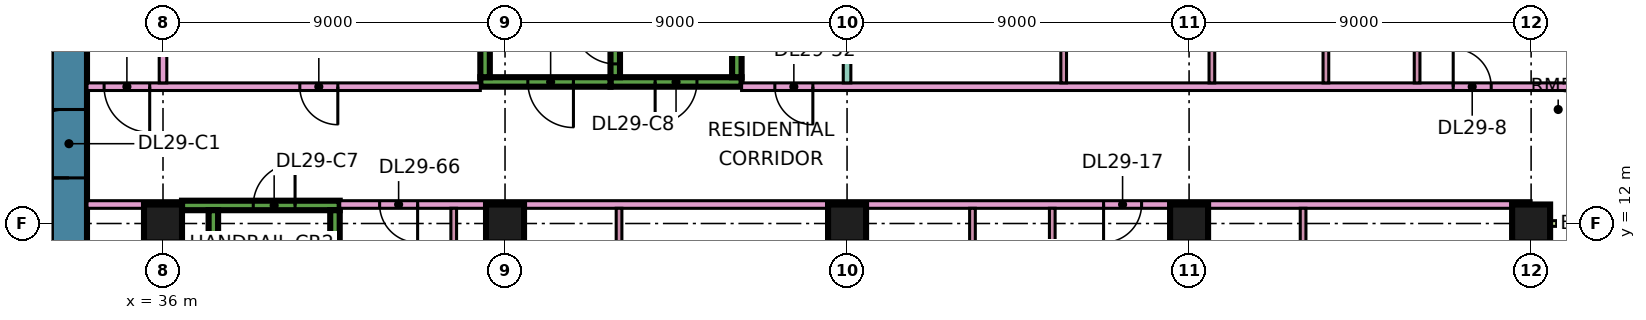
"""IFC4 building model, lengths in metres.
Left out: names, types, materials, properties, quantities, classifications, styles, units other than length and angle.
Written with IfcOpenShell. Run it as: python <this file> out.ifc"""

import sys

from ifc_helpers import new_model, si_unit, direction, frame, frame_2d, origin, origin_2d, place, context, subcontext, project, spatial, rectangle, extrude, element, fill, save


model = new_model("IFC4")
c1 = context("Model", 3, precision=1e-05, world=origin(), true_north=direction((0.0, 1.0)))
c2 = subcontext(c1, "Body", "Model", "MODEL_VIEW")
j1 = project(units=[si_unit("LENGTHUNIT", "METRE"), si_unit("PLANEANGLEUNIT", "RADIAN")], contexts=[c1])
p1 = place(None, origin())
s1 = spatial("IfcSite", under=j1, at=p1, CompositionType="ELEMENT")
p2 = place(p1, origin())
s2 = spatial("IfcBuilding", under=s1, at=p2, CompositionType="ELEMENT")
p3 = place(p2, frame((0.0, 0.0, 125.65)))
s3 = spatial("IfcBuildingStorey", under=s2, at=p3, CompositionType="ELEMENT", Elevation=125.65)
for number, where, z_axis, x_axis in (
    (1, (36.0, 12.0, 0.0), (0.0, 0.0, 1.0), (1.0, 0.0, 0.0)),
    (2, (45.0, 12.0, 0.0), (0.0, 0.0, 1.0), (1.0, 0.0, 0.0)),
    (3, (54.0, 12.0, 0.0), (0.0, 0.0, 1.0), (1.0, 0.0, 0.0)),
    (4, (63.0, 12.0, 0.0), (0.0, 0.0, 1.0), (1.0, 0.0, 0.0)),
    (5, (72.0, 12.0, 0.0), (0.0, 0.0, 1.0), (1.0, 0.0, 0.0)),
):
    element("IfcColumn", number, at=place(p3, frame(where, z_axis=z_axis, x_axis=x_axis)), inside=s3, PredefinedType="COLUMN", context=c2, shape_type="SweptSolid", body=[
        extrude(rectangle(XDim=1.0, YDim=1.0, at=origin_2d()), origin(), (0.0, 0.0, 1.0), 3.75),
    ])
p4 = place(p3, frame((33.525, 7.95, 0.0), z_axis=(0.0, 0.0, 1.0), x_axis=(0.0, 1.0, 0.0)))
e6 = element("IfcWall", 6, at=p4, inside=s3, PredefinedType="SHEAR", context=c2, shape_type="SweptSolid", body=[
    extrude(rectangle(XDim=11.1, YDim=0.95, at=frame_2d((5.55, 0.0))), origin(), (0.0, 0.0, 1.0), 3.75),
])
p5 = place(p4, frame((5.25, 0.0, 0.0)))
e7 = element("IfcOpeningElement", 7, at=p5, cuts=e6, PredefinedType="OPENING", context=c2, shape_type="SweptSolid", body=[
    extrude(rectangle(XDim=1.8, YDim=2.4, at=frame_2d((0.9, 1.2))), frame((0.0, 0.485, 0.0), z_axis=(0.0, -1.0, 0.0), x_axis=(1.0, 0.0, 0.0)), (0.0, 0.0, 1.0), 0.97),
])
p6 = place(p3, frame((36.5, 12.475, 0.0), z_axis=(0.0, 0.0, 1.0), x_axis=(1.0, 0.0, 0.0)))
e8 = element("IfcWall", 8, at=p6, inside=s3, PredefinedType="SHEAR", context=c2, shape_type="SweptSolid", body=[
    extrude(rectangle(XDim=4.15, YDim=0.25, at=frame_2d((2.075, 0.0))), origin(), (0.0, 0.0, 1.0), 3.75),
])
p7 = place(p6, frame((1.875, 0.0, 0.0)))
e9 = element("IfcOpeningElement", 9, at=p7, cuts=e8, PredefinedType="OPENING", context=c2, shape_type="SweptSolid", body=[
    extrude(rectangle(XDim=1.1, YDim=2.2, at=frame_2d((0.55, 1.1))), frame((0.0, 0.135, 0.0), z_axis=(0.0, -1.0, 0.0), x_axis=(1.0, 0.0, 0.0)), (0.0, 0.0, 1.0), 0.27),
])
for number, where, z_axis, x_axis in (
    (10, (37.325, 5.85, 0.0), (0.0, 0.0, 1.0), (0.0, 1.0, 0.0)),
    (11, (40.525, 5.85, 0.0), (0.0, 0.0, 1.0), (0.0, 1.0, 0.0)),
):
    element("IfcWall", number, at=place(p3, frame(where, z_axis=z_axis, x_axis=x_axis)), inside=s3, PredefinedType="SHEAR", context=c2, shape_type="SweptSolid", body=[
        extrude(rectangle(XDim=6.5, YDim=0.25, at=frame_2d((3.25, 0.0))), origin(), (0.0, 0.0, 1.0), 3.75),
    ])
p8 = place(p3, frame((47.775, 15.725, 0.0), z_axis=(0.0, 0.0, 1.0), x_axis=(1.0, 0.0, 0.0)))
e12 = element("IfcWall", 12, at=p8, inside=s3, PredefinedType="SHEAR", context=c2, shape_type="SweptSolid", body=[
    extrude(rectangle(XDim=3.45, YDim=0.25, at=frame_2d((1.725, 0.0))), origin(), (0.0, 0.0, 1.0), 3.75),
])
p9 = place(p8, frame((1.175, 0.0, 0.0)))
e13 = element("IfcOpeningElement", 13, at=p9, cuts=e12, PredefinedType="OPENING", context=c2, shape_type="SweptSolid", body=[
    extrude(rectangle(XDim=1.1, YDim=2.2, at=frame_2d((0.55, 1.1))), frame((0.0, 0.135, 0.0), z_axis=(0.0, -1.0, 0.0), x_axis=(1.0, 0.0, 0.0)), (0.0, 0.0, 1.0), 0.27),
])
p10 = place(p3, frame((47.9, 15.85, 0.0), z_axis=(0.0, 0.0, 1.0), x_axis=(0.0, 1.0, 0.0)))
e14 = element("IfcWall", 14, at=p10, inside=s3, PredefinedType="SHEAR", context=c2, shape_type="SweptSolid", body=[
    extrude(rectangle(XDim=6.5, YDim=0.25, at=frame_2d((3.25, 0.0))), origin(), (0.0, 0.0, 1.0), 3.75),
])
p11 = place(p10, frame((0.35, 0.0, 0.0)))
e15 = element("IfcOpeningElement", 15, at=p11, cuts=e14, PredefinedType="OPENING", context=c2, shape_type="SweptSolid", body=[
    extrude(rectangle(XDim=1.1, YDim=2.2, at=frame_2d((0.55, 1.1))), frame((0.0, 0.135, 0.0), z_axis=(0.0, -1.0, 0.0), x_axis=(1.0, 0.0, 0.0)), (0.0, 0.0, 1.0), 0.27),
])
p12 = place(p3, frame((51.1, 15.85, 0.0), z_axis=(0.0, 0.0, 1.0), x_axis=(0.0, 1.0, 0.0)))
e16 = element("IfcWall", 16, at=p12, inside=s3, PredefinedType="SHEAR", context=c2, shape_type="SweptSolid", body=[
    extrude(rectangle(XDim=6.5, YDim=0.25, at=frame_2d((3.25, 0.0))), origin(), (0.0, 0.0, 1.0), 3.75),
])
p13 = place(p3, frame((44.35, 15.725, 0.0), z_axis=(0.0, 0.0, 1.0), x_axis=(1.0, 0.0, 0.0)))
e17 = element("IfcWall", 17, at=p13, inside=s3, PredefinedType="SHEAR", context=c2, shape_type="SweptSolid", body=[
    extrude(rectangle(XDim=3.425, YDim=0.25, at=frame_2d((1.712, 0.0))), origin(), (0.0, 0.0, 1.0), 3.75),
])
p14 = place(p13, frame((1.25, 0.0, 0.0)))
e18 = element("IfcOpeningElement", 18, at=p14, cuts=e17, PredefinedType="OPENING", context=c2, shape_type="SweptSolid", body=[
    extrude(rectangle(XDim=1.2, YDim=2.2, at=frame_2d((0.6, 1.1))), frame((0.0, 0.135, 0.0), z_axis=(0.0, -1.0, 0.0), x_axis=(1.0, 0.0, 0.0)), (0.0, 0.0, 1.0), 0.27),
])
p15 = place(p3, frame((44.475, 15.85, 0.0), z_axis=(0.0, 0.0, 1.0), x_axis=(0.0, 1.0, 0.0)))
e19 = element("IfcWall", 19, at=p15, inside=s3, PredefinedType="SHEAR", context=c2, shape_type="SweptSolid", body=[
    extrude(rectangle(XDim=6.5, YDim=0.25, at=frame_2d((3.25, 0.0))), origin(), (0.0, 0.0, 1.0), 3.75),
])
p16 = place(p15, frame((1.75, 0.0, 0.0)))
e20 = element("IfcOpeningElement", 20, at=p16, cuts=e19, PredefinedType="OPENING", context=c2, shape_type="SweptSolid", body=[
    extrude(rectangle(XDim=1.1, YDim=2.2, at=frame_2d((0.55, 1.1))), frame((0.0, 0.135, 0.0), z_axis=(0.0, -1.0, 0.0), x_axis=(1.0, 0.0, 0.0)), (0.0, 0.0, 1.0), 0.27),
])
p17 = place(p15, frame((4.3, 0.0, 0.0)))
e21 = element("IfcOpeningElement", 21, at=p17, cuts=e19, PredefinedType="OPENING", context=c2, shape_type="SweptSolid", body=[
    extrude(rectangle(XDim=1.1, YDim=2.2, at=frame_2d((0.55, 1.1))), frame((0.0, 0.135, 0.0), z_axis=(0.0, -1.0, 0.0), x_axis=(1.0, 0.0, 0.0)), (0.0, 0.0, 1.0), 0.27),
])
p18 = place(p3, frame((72.0, 1.575, 0.0), z_axis=(0.0, 0.0, 1.0), x_axis=(0.0, 1.0, 0.0)))
e22 = element("IfcWall", 22, at=p18, inside=s3, PredefinedType="SOLIDWALL", context=c2, shape_type="SweptSolid", body=[
    extrude(rectangle(XDim=10.35, YDim=0.15, at=frame_2d((5.175, 0.0))), origin(), (0.0, 0.0, 1.0), 3.35),
])
p19 = place(p18, frame((1.562, 0.0, 0.0)))
e23 = element("IfcOpeningElement", 23, at=p19, cuts=e22, PredefinedType="OPENING", context=c2, shape_type="SweptSolid", body=[
    extrude(rectangle(XDim=1.8, YDim=2.4, at=frame_2d((0.9, 1.2))), frame((0.0, 0.085, 0.0), z_axis=(0.0, -1.0, 0.0), x_axis=(1.0, 0.0, 0.0)), (0.0, 0.0, 1.0), 0.17),
])
p20 = place(p18, frame((6.475, 0.0, 0.45)))
e24 = element("IfcOpeningElement", 24, at=p20, cuts=e22, PredefinedType="OPENING", context=c2, shape_type="SweptSolid", body=[
    extrude(rectangle(XDim=3.0, YDim=2.4, at=frame_2d((1.5, 1.2))), frame((0.0, 0.085, 0.0), z_axis=(0.0, -1.0, 0.0), x_axis=(1.0, 0.0, 0.0)), (0.0, 0.0, 1.0), 0.17),
])
p21 = place(p3, frame((73.5, 12.0, 0.0), z_axis=(0.0, 0.0, 1.0), x_axis=(-1.0, 0.0, 0.0)))
e25 = element("IfcWall", 25, at=p21, inside=s3, PredefinedType="SOLIDWALL", context=c2, shape_type="SweptSolid", body=[
    extrude(rectangle(XDim=1.5, YDim=0.15, at=frame_2d((0.75, 0.0))), origin(), (0.0, 0.0, 1.0), 3.35),
])
p22 = place(p3, frame((34.0, 12.5, 0.0), z_axis=(0.0, 0.0, 1.0), x_axis=(1.0, 0.0, 0.0)))
e26 = element("IfcWall", 26, at=p22, inside=s3, PredefinedType="PARTITIONING", context=c2, shape_type="SweptSolid", body=[
    extrude(rectangle(XDim=2.501, YDim=0.2, at=frame_2d((1.25, 0.0))), origin(), (0.0, 0.0, 1.0), 3.35),
])
p23 = place(p3, frame((34.0, 15.6, 0.0), z_axis=(0.0, 0.0, 1.0), x_axis=(1.0, 0.0, 0.0)))
e27 = element("IfcWall", 27, at=p23, inside=s3, PredefinedType="PARTITIONING", context=c2, shape_type="SweptSolid", body=[
    extrude(rectangle(XDim=10.35, YDim=0.2, at=frame_2d((5.175, 0.0))), origin(), (0.0, 0.0, 1.0), 3.35),
])
p24 = place(p23, frame((5.6, 0.0, 0.0)))
e28 = element("IfcOpeningElement", 28, at=p24, cuts=e27, PredefinedType="OPENING", context=c2, shape_type="SweptSolid", body=[
    extrude(rectangle(XDim=1.0, YDim=2.1, at=frame_2d((0.5, 1.05))), frame((0.0, 0.11, 0.0), z_axis=(0.0, -1.0, 0.0), x_axis=(1.0, 0.0, 0.0)), (0.0, 0.0, 1.0), 0.22),
])
p25 = place(p23, frame((0.45, 0.0, 0.0)))
e29 = element("IfcOpeningElement", 29, at=p25, cuts=e27, PredefinedType="OPENING", context=c2, shape_type="SweptSolid", body=[
    extrude(rectangle(XDim=1.2, YDim=2.1, at=frame_2d((0.6, 1.05))), frame((0.0, 0.11, 0.0), z_axis=(0.0, -1.0, 0.0), x_axis=(1.0, 0.0, 0.0)), (0.0, 0.0, 1.0), 0.22),
])
p26 = place(p3, frame((36.0, 15.7, 0.0), z_axis=(0.0, 0.0, 1.0), x_axis=(0.0, 1.0, 0.0)))
e30 = element("IfcWall", 30, at=p26, inside=s3, PredefinedType="PARTITIONING", context=c2, shape_type="SweptSolid", body=[
    extrude(rectangle(XDim=8.3, YDim=0.2, at=frame_2d((4.15, 0.0))), origin(), (0.0, 0.0, 1.0), 3.35),
])
p27 = place(p3, frame((40.65, 12.5, 0.0), z_axis=(0.0, 0.0, 1.0), x_axis=(1.0, 0.0, 0.0)))
e31 = element("IfcWall", 31, at=p27, inside=s3, PredefinedType="PARTITIONING", context=c2, shape_type="SweptSolid", body=[
    extrude(rectangle(XDim=31.35, YDim=0.2, at=frame_2d((15.675, 0.0))), origin(), (0.0, 0.0, 1.0), 3.35),
])
p28 = place(p27, frame((20.1, 0.0, 0.0)))
e32 = element("IfcOpeningElement", 32, at=p28, cuts=e31, PredefinedType="OPENING", context=c2, shape_type="SweptSolid", body=[
    extrude(rectangle(XDim=1.0, YDim=2.1, at=frame_2d((0.5, 1.05))), frame((0.0, 0.11, 0.0), z_axis=(0.0, -1.0, 0.0), x_axis=(1.0, 0.0, 0.0)), (0.0, 0.0, 1.0), 0.22),
])
p29 = place(p27, frame((1.05, 0.0, 0.0)))
e33 = element("IfcOpeningElement", 33, at=p29, cuts=e31, PredefinedType="OPENING", context=c2, shape_type="SweptSolid", body=[
    extrude(rectangle(XDim=1.0, YDim=2.1, at=frame_2d((0.5, 1.05))), frame((0.0, 0.11, 0.0), z_axis=(0.0, -1.0, 0.0), x_axis=(1.0, 0.0, 0.0)), (0.0, 0.0, 1.0), 0.22),
])
p30 = place(p3, frame((43.65, 5.975, 0.0), z_axis=(0.0, 0.0, 1.0), x_axis=(0.0, 1.0, 0.0)))
e34 = element("IfcWall", 34, at=p30, inside=s3, PredefinedType="PARTITIONING", context=c2, shape_type="SweptSolid", body=[
    extrude(rectangle(XDim=6.425, YDim=0.15, at=frame_2d((3.212, 0.0))), origin(), (0.0, 0.0, 1.0), 3.35),
])
p31 = place(p30, frame((4.275, 0.0, 0.0)))
e35 = element("IfcOpeningElement", 35, at=p31, cuts=e34, PredefinedType="OPENING", context=c2, shape_type="SweptSolid", body=[
    extrude(rectangle(XDim=0.9, YDim=2.1, at=frame_2d((0.45, 1.05))), frame((0.0, 0.085, 0.0), z_axis=(0.0, -1.0, 0.0), x_axis=(1.0, 0.0, 0.0)), (0.0, 0.0, 1.0), 0.17),
])
p32 = place(p3, frame((48.0, 5.975, 0.0), z_axis=(0.0, 0.0, 1.0), x_axis=(0.0, 1.0, 0.0)))
e36 = element("IfcWall", 36, at=p32, inside=s3, PredefinedType="PARTITIONING", context=c2, shape_type="SweptSolid", body=[
    extrude(rectangle(XDim=6.425, YDim=0.15, at=frame_2d((3.212, 0.0))), origin(), (0.0, 0.0, 1.0), 3.35),
])
p33 = place(p3, frame((51.225, 15.6, 0.0), z_axis=(0.0, 0.0, 1.0), x_axis=(1.0, 0.0, 0.0)))
e37 = element("IfcWall", 37, at=p33, inside=s3, PredefinedType="PARTITIONING", context=c2, shape_type="SweptSolid", body=[
    extrude(rectangle(XDim=22.125, YDim=0.2, at=frame_2d((11.062, 0.0))), origin(), (0.0, 0.0, 1.0), 3.35),
])
p34 = place(p33, frame((18.725, 0.0, 0.0)))
e38 = element("IfcOpeningElement", 38, at=p34, cuts=e37, PredefinedType="OPENING", context=c2, shape_type="SweptSolid", body=[
    extrude(rectangle(XDim=1.0, YDim=2.1, at=frame_2d((0.5, 1.05))), frame((0.0, 0.11, 0.0), z_axis=(0.0, -1.0, 0.0), x_axis=(1.0, 0.0, 0.0)), (0.0, 0.0, 1.0), 0.22),
])
p35 = place(p33, frame((0.875, 0.0, 0.0)))
e39 = element("IfcOpeningElement", 39, at=p35, cuts=e37, PredefinedType="OPENING", context=c2, shape_type="SweptSolid", body=[
    extrude(rectangle(XDim=1.0, YDim=2.1, at=frame_2d((0.5, 1.05))), frame((0.0, 0.11, 0.0), z_axis=(0.0, -1.0, 0.0), x_axis=(1.0, 0.0, 0.0)), (0.0, 0.0, 1.0), 0.22),
])
p36 = place(p3, frame((54.0, 0.074, 0.0), z_axis=(0.0, 0.0, 1.0), x_axis=(0.0, 1.0, 0.0)))
e40 = element("IfcWall", 40, at=p36, inside=s3, PredefinedType="PARTITIONING", context=c2, shape_type="SweptSolid", body=[
    extrude(rectangle(XDim=12.326, YDim=0.2, at=frame_2d((6.163, 0.0))), origin(), (0.0, 0.0, 1.0), 3.35),
])
p37 = place(p3, frame((54.0, 15.7, 0.0), z_axis=(0.0, 0.0, 1.0), x_axis=(0.0, 1.0, 0.0)))
e41 = element("IfcWall", 41, at=p37, inside=s3, PredefinedType="PARTITIONING", context=c2, shape_type="SweptSolid", body=[
    extrude(rectangle(XDim=8.226, YDim=0.2, at=frame_2d((4.113, 0.0))), origin(), (0.0, 0.0, 1.0), 3.35),
])
p38 = place(p3, frame((57.3, 7.775, 0.0), z_axis=(0.0, 0.0, 1.0), x_axis=(0.0, 1.0, 0.0)))
e42 = element("IfcWall", 42, at=p38, inside=s3, PredefinedType="PARTITIONING", context=c2, shape_type="SweptSolid", body=[
    extrude(rectangle(XDim=4.625, YDim=0.15, at=frame_2d((2.312, 0.0))), origin(), (0.0, 0.0, 1.0), 3.35),
])
p39 = place(p3, frame((59.4, 7.775, 0.0), z_axis=(0.0, 0.0, 1.0), x_axis=(0.0, 1.0, 0.0)))
e43 = element("IfcWall", 43, at=p39, inside=s3, PredefinedType="PARTITIONING", context=c2, shape_type="SweptSolid", body=[
    extrude(rectangle(XDim=4.625, YDim=0.15, at=frame_2d((2.312, 0.0))), origin(), (0.0, 0.0, 1.0), 3.35),
])
p40 = place(p39, frame((1.975, 0.0, 0.0)))
e44 = element("IfcOpeningElement", 44, at=p40, cuts=e43, PredefinedType="OPENING", context=c2, shape_type="SweptSolid", body=[
    extrude(rectangle(XDim=0.8, YDim=2.1, at=frame_2d((0.4, 1.05))), frame((0.0, 0.085, 0.0), z_axis=(0.0, -1.0, 0.0), x_axis=(1.0, 0.0, 0.0)), (0.0, 0.0, 1.0), 0.17),
])
p41 = place(p3, frame((59.7, 15.7, 0.0), z_axis=(0.0, 0.0, 1.0), x_axis=(0.0, 1.0, 0.0)))
e45 = element("IfcWall", 45, at=p41, inside=s3, PredefinedType="PARTITIONING", context=c2, shape_type="SweptSolid", body=[
    extrude(rectangle(XDim=3.125, YDim=0.15, at=frame_2d((1.562, 0.0))), origin(), (0.0, 0.0, 1.0), 3.35),
])
p42 = place(p3, frame((63.0, 7.775, 0.0), z_axis=(0.0, 0.0, 1.0), x_axis=(0.0, 1.0, 0.0)))
e46 = element("IfcWall", 46, at=p42, inside=s3, PredefinedType="PARTITIONING", context=c2, shape_type="SweptSolid", body=[
    extrude(rectangle(XDim=4.625, YDim=0.15, at=frame_2d((2.312, 0.0))), origin(), (0.0, 0.0, 1.0), 3.35),
])
p43 = place(p3, frame((63.6, 15.7, 0.0), z_axis=(0.0, 0.0, 1.0), x_axis=(0.0, 1.0, 0.0)))
e47 = element("IfcWall", 47, at=p43, inside=s3, PredefinedType="PARTITIONING", context=c2, shape_type="SweptSolid", body=[
    extrude(rectangle(XDim=3.125, YDim=0.15, at=frame_2d((1.562, 0.0))), origin(), (0.0, 0.0, 1.0), 3.35),
])
p44 = place(p3, frame((66.0, 7.775, 0.0), z_axis=(0.0, 0.0, 1.0), x_axis=(0.0, 1.0, 0.0)))
e48 = element("IfcWall", 48, at=p44, inside=s3, PredefinedType="PARTITIONING", context=c2, shape_type="SweptSolid", body=[
    extrude(rectangle(XDim=4.625, YDim=0.15, at=frame_2d((2.312, 0.0))), origin(), (0.0, 0.0, 1.0), 3.35),
])
p45 = place(p3, frame((66.6, 15.7, 0.0), z_axis=(0.0, 0.0, 1.0), x_axis=(0.0, 1.0, 0.0)))
e49 = element("IfcWall", 49, at=p45, inside=s3, PredefinedType="PARTITIONING", context=c2, shape_type="SweptSolid", body=[
    extrude(rectangle(XDim=3.125, YDim=0.15, at=frame_2d((1.562, 0.0))), origin(), (0.0, 0.0, 1.0), 3.35),
])
p46 = place(p3, frame((69.0, 15.7, 0.0), z_axis=(0.0, 0.0, 1.0), x_axis=(0.0, 1.0, 0.0)))
e50 = element("IfcWall", 50, at=p46, inside=s3, PredefinedType="PARTITIONING", context=c2, shape_type="SweptSolid", body=[
    extrude(rectangle(XDim=3.125, YDim=0.15, at=frame_2d((1.562, 0.0))), origin(), (0.0, 0.0, 1.0), 3.35),
])
p47 = place(p46, frame((1.2, 0.0, 0.0)))
e51 = element("IfcOpeningElement", 51, at=p47, cuts=e50, PredefinedType="OPENING", context=c2, shape_type="SweptSolid", body=[
    extrude(rectangle(XDim=0.8, YDim=2.1, at=frame_2d((0.4, 1.05))), frame((0.0, 0.085, 0.0), z_axis=(0.0, -1.0, 0.0), x_axis=(1.0, 0.0, 0.0)), (0.0, 0.0, 1.0), 0.17),
])
p48 = place(p5, origin())
e52 = element("IfcDoor", 52, at=p48, inside=s3, OperationType="DOUBLE_DOOR_SINGLE_SWING", PredefinedType="DOOR", context=c2, shape_type="SweptSolid", body=[
    extrude(rectangle(XDim=1.8, YDim=2.4, at=frame_2d((0.9, 1.2))), frame((0.0, 0.025, 0.0), z_axis=(0.0, -1.0, 0.0), x_axis=(1.0, 0.0, 0.0)), (0.0, 0.0, 1.0), 0.05),
])
fill(e7, e52)
p49 = place(p7, frame((1.1, 0.0, 0.0), z_axis=(0.0, 0.0, 1.0), x_axis=(-1.0, 0.0, 0.0)))
e53 = element("IfcDoor", 53, at=p49, inside=s3, OperationType="SINGLE_SWING_RIGHT", PredefinedType="DOOR", context=c2, shape_type="SweptSolid", body=[
    extrude(rectangle(XDim=1.1, YDim=2.2, at=frame_2d((0.55, 1.1))), frame((0.0, 0.025, 0.0), z_axis=(0.0, -1.0, 0.0), x_axis=(1.0, 0.0, 0.0)), (0.0, 0.0, 1.0), 0.05),
])
fill(e9, e53)
p50 = place(p9, frame((1.1, 0.0, 0.0), z_axis=(0.0, 0.0, 1.0), x_axis=(-1.0, 0.0, 0.0)))
e54 = element("IfcDoor", 54, at=p50, inside=s3, OperationType="SINGLE_SWING_LEFT", PredefinedType="DOOR", context=c2, shape_type="SweptSolid", body=[
    extrude(rectangle(XDim=1.1, YDim=2.2, at=frame_2d((0.55, 1.1))), frame((0.0, 0.025, 0.0), z_axis=(0.0, -1.0, 0.0), x_axis=(1.0, 0.0, 0.0)), (0.0, 0.0, 1.0), 0.05),
])
fill(e13, e54)
p51 = place(p14, origin())
e55 = element("IfcDoor", 55, at=p51, inside=s3, OperationType="SINGLE_SWING_RIGHT", PredefinedType="DOOR", context=c2, shape_type="SweptSolid", body=[
    extrude(rectangle(XDim=1.2, YDim=2.2, at=frame_2d((0.6, 1.1))), frame((0.0, 0.025, 0.0), z_axis=(0.0, -1.0, 0.0), x_axis=(1.0, 0.0, 0.0)), (0.0, 0.0, 1.0), 0.05),
])
fill(e18, e55)
p52 = place(p11, frame((1.1, 0.0, 0.0), z_axis=(0.0, 0.0, 1.0), x_axis=(-1.0, 0.0, 0.0)))
e56 = element("IfcDoor", 56, at=p52, inside=s3, OperationType="SINGLE_SWING_RIGHT", PredefinedType="DOOR", context=c2, shape_type="SweptSolid", body=[
    extrude(rectangle(XDim=1.1, YDim=2.2, at=frame_2d((0.55, 1.1))), frame((0.0, 0.025, 0.0), z_axis=(0.0, -1.0, 0.0), x_axis=(1.0, 0.0, 0.0)), (0.0, 0.0, 1.0), 0.05),
])
fill(e15, e56)
p53 = place(p24, origin())
e57 = element("IfcDoor", 57, at=p53, inside=s3, OperationType="SINGLE_SWING_RIGHT", PredefinedType="DOOR", context=c2, shape_type="SweptSolid", body=[
    extrude(rectangle(XDim=1.0, YDim=2.1, at=frame_2d((0.5, 1.05))), frame((0.0, 0.025, 0.0), z_axis=(0.0, -1.0, 0.0), x_axis=(1.0, 0.0, 0.0)), (0.0, 0.0, 1.0), 0.05),
])
fill(e28, e57)
p54 = place(p34, origin())
e58 = element("IfcDoor", 58, at=p54, inside=s3, OperationType="SINGLE_SWING_LEFT", PredefinedType="DOOR", context=c2, shape_type="SweptSolid", body=[
    extrude(rectangle(XDim=1.0, YDim=2.1, at=frame_2d((0.5, 1.05))), frame((0.0, 0.025, 0.0), z_axis=(0.0, -1.0, 0.0), x_axis=(1.0, 0.0, 0.0)), (0.0, 0.0, 1.0), 0.05),
])
fill(e38, e58)
p55 = place(p28, frame((1.0, 0.0, 0.0), z_axis=(0.0, 0.0, 1.0), x_axis=(-1.0, 0.0, 0.0)))
e59 = element("IfcDoor", 59, at=p55, inside=s3, OperationType="SINGLE_SWING_LEFT", PredefinedType="DOOR", context=c2, shape_type="SweptSolid", body=[
    extrude(rectangle(XDim=1.0, YDim=2.1, at=frame_2d((0.5, 1.05))), frame((0.0, 0.025, 0.0), z_axis=(0.0, -1.0, 0.0), x_axis=(1.0, 0.0, 0.0)), (0.0, 0.0, 1.0), 0.05),
])
fill(e32, e59)
p56 = place(p25, origin())
e60 = element("IfcDoor", 60, at=p56, inside=s3, OperationType="SINGLE_SWING_RIGHT", PredefinedType="DOOR", context=c2, shape_type="SweptSolid", body=[
    extrude(rectangle(XDim=1.2, YDim=2.1, at=frame_2d((0.6, 1.05))), frame((0.0, 0.025, 0.0), z_axis=(0.0, -1.0, 0.0), x_axis=(1.0, 0.0, 0.0)), (0.0, 0.0, 1.0), 0.05),
])
fill(e29, e60)
p57 = place(p35, origin())
e61 = element("IfcDoor", 61, at=p57, inside=s3, OperationType="SINGLE_SWING_RIGHT", PredefinedType="DOOR", context=c2, shape_type="SweptSolid", body=[
    extrude(rectangle(XDim=1.0, YDim=2.1, at=frame_2d((0.5, 1.05))), frame((0.0, 0.025, 0.0), z_axis=(0.0, -1.0, 0.0), x_axis=(1.0, 0.0, 0.0)), (0.0, 0.0, 1.0), 0.05),
])
fill(e39, e61)
p58 = place(p29, origin())
e62 = element("IfcDoor", 62, at=p58, inside=s3, OperationType="SINGLE_SWING_RIGHT", PredefinedType="DOOR", context=c2, shape_type="SweptSolid", body=[
    extrude(rectangle(XDim=1.0, YDim=2.1, at=frame_2d((0.5, 1.05))), frame((0.0, 0.025, 0.0), z_axis=(0.0, -1.0, 0.0), x_axis=(1.0, 0.0, 0.0)), (0.0, 0.0, 1.0), 0.05),
])
fill(e33, e62)
save(model, sys.argv[1])
